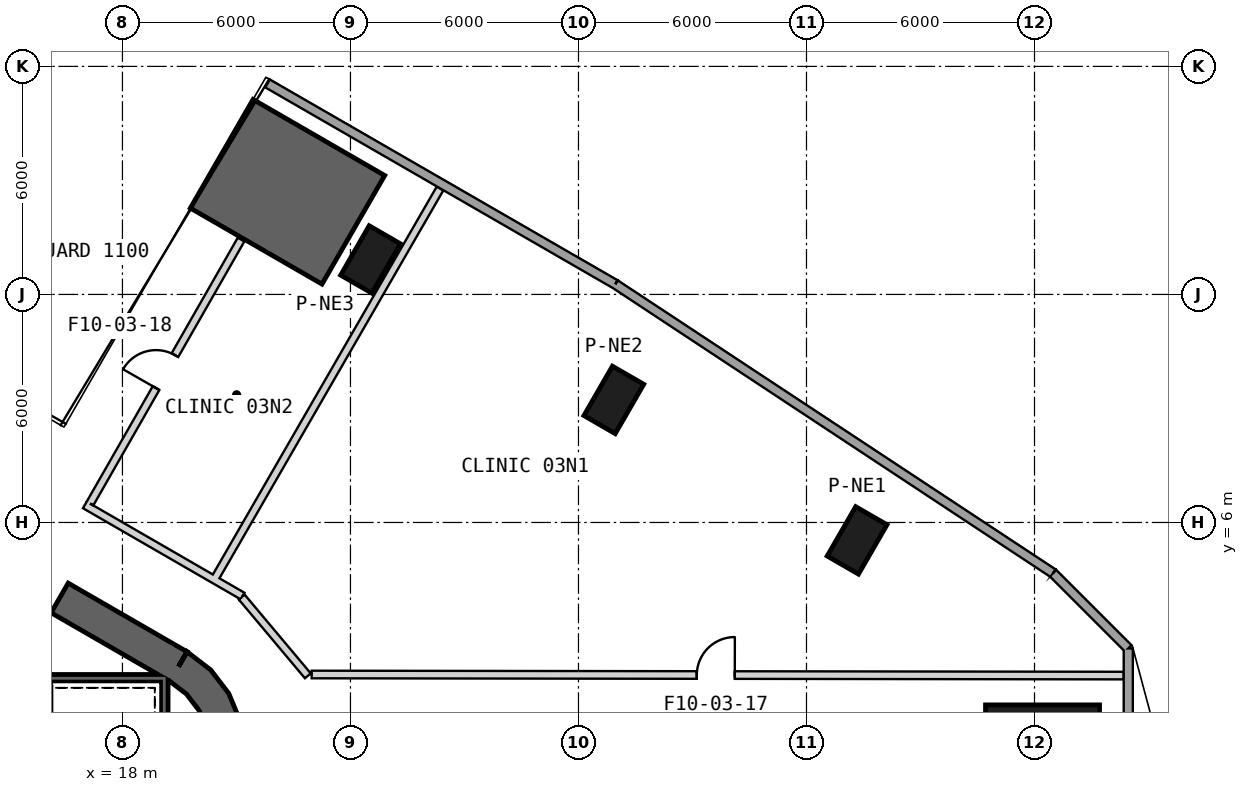
"""IFC4 building model, lengths in metres.
Left out: names, types, materials, properties, quantities, classifications, styles, units other than length and angle.
Written with IfcOpenShell. Run it as: python <this file> out.ifc"""

import sys

from ifc_helpers import new_model, si_unit, direction, frame, frame_2d, origin, origin_2d, place, context, subcontext, project, spatial, polyline, rectangle, outline, extrude, element, fill, save


model = new_model("IFC4")
c1 = context("Model", 3, precision=1e-05, world=origin(), true_north=direction((0.0, 1.0)))
c2 = subcontext(c1, "Body", "Model", "MODEL_VIEW")
j1 = project(units=[si_unit("LENGTHUNIT", "METRE"), si_unit("PLANEANGLEUNIT", "RADIAN")], contexts=[c1])
p1 = place(None, origin())
s1 = spatial("IfcSite", under=j1, at=p1, CompositionType="ELEMENT")
p2 = place(p1, origin())
s2 = spatial("IfcBuilding", under=s1, at=p2, CompositionType="ELEMENT")
p3 = place(p2, frame((0.0, 0.0, 21.5)))
s3 = spatial("IfcBuildingStorey", under=s2, at=p3, CompositionType="ELEMENT", Elevation=21.5)
p4 = place(p3, frame((42.211, 0.0, 0.0), z_axis=(0.0, 0.0, 1.0), x_axis=(1.0, 0.0, 0.0)))
e1 = element("IfcColumn", 1, at=p4, inside=s3, PredefinedType="COLUMN", context=c2, shape_type="SweptSolid", body=[
    extrude(rectangle(XDim=3.0, YDim=2.4, at=origin_2d()), origin(), (0.0, 0.0, 1.0), 6.0),
])
for number, where, z_axis, x_axis in (
    (2, (37.331, 5.528, 0.0), (0.0, 0.0, 1.0), (0.5, 0.866, 0.0)),
    (3, (30.93, 9.224, 0.0), (0.0, 0.0, 1.0), (0.5, 0.866, 0.0)),
    (4, (24.529, 12.92, 0.0), (0.0, 0.0, 1.0), (0.5, 0.866, 0.0)),
):
    element("IfcColumn", number, at=place(p3, frame(where, z_axis=z_axis, x_axis=x_axis)), inside=s3, PredefinedType="COLUMN", context=c2, shape_type="SweptSolid", body=[
        extrude(rectangle(XDim=1.5, YDim=0.95, at=origin_2d()), origin(), (0.0, 0.0, 1.0), 6.0),
    ])
p5 = place(p3, frame((19.475, 2.208, 0.0), z_axis=(0.0, 0.0, 1.0), x_axis=(-0.866028369851, 0.499994862586, 0.0)))
e5 = element("IfcWall", 5, at=p5, inside=s3, PredefinedType="SHEAR", context=c2, shape_type="SweptSolid", body=[
    extrude(rectangle(XDim=31.523, YDim=0.9, at=frame_2d((15.762, 0.0))), origin(), (0.0, 0.0, 1.0), 6.0),
])
p6 = place(p5, frame((7.062, 0.0, 0.0)))
e6 = element("IfcOpeningElement", 6, at=p6, cuts=e5, PredefinedType="OPENING", context=c2, shape_type="SweptSolid", body=[
    extrude(rectangle(XDim=1.2, YDim=2.4, at=frame_2d((0.6, 1.2))), frame((0.0, 0.46, 0.0), z_axis=(0.0, -1.0, 0.0), x_axis=(1.0, 0.0, 0.0)), (0.0, 0.0, 1.0), 0.92),
])
p7 = place(p5, frame((9.762, 0.0, 0.0)))
e7 = element("IfcOpeningElement", 7, at=p7, cuts=e5, PredefinedType="OPENING", context=c2, shape_type="SweptSolid", body=[
    extrude(rectangle(XDim=1.2, YDim=2.4, at=frame_2d((0.6, 1.2))), frame((0.0, 0.46, 0.0), z_axis=(0.0, -1.0, 0.0), x_axis=(1.0, 0.0, 0.0)), (0.0, 0.0, 1.0), 0.92),
])
p8 = place(p5, frame((12.462, 0.0, 0.0)))
e8 = element("IfcOpeningElement", 8, at=p8, cuts=e5, PredefinedType="OPENING", context=c2, shape_type="SweptSolid", body=[
    extrude(rectangle(XDim=1.2, YDim=2.4, at=frame_2d((0.6, 1.2))), frame((0.0, 0.46, 0.0), z_axis=(0.0, -1.0, 0.0), x_axis=(1.0, 0.0, 0.0)), (0.0, 0.0, 1.0), 0.92),
])
p9 = place(p5, frame((15.162, 0.0, 0.0)))
e9 = element("IfcOpeningElement", 9, at=p9, cuts=e5, PredefinedType="OPENING", context=c2, shape_type="SweptSolid", body=[
    extrude(rectangle(XDim=1.2, YDim=2.4, at=frame_2d((0.6, 1.2))), frame((0.0, 0.46, 0.0), z_axis=(0.0, -1.0, 0.0), x_axis=(1.0, 0.0, 0.0)), (0.0, 0.0, 1.0), 0.92),
])
p10 = place(p5, frame((17.862, 0.0, 0.0)))
e10 = element("IfcOpeningElement", 10, at=p10, cuts=e5, PredefinedType="OPENING", context=c2, shape_type="SweptSolid", body=[
    extrude(rectangle(XDim=1.2, YDim=2.4, at=frame_2d((0.6, 1.2))), frame((0.0, 0.46, 0.0), z_axis=(0.0, -1.0, 0.0), x_axis=(1.0, 0.0, 0.0)), (0.0, 0.0, 1.0), 0.92),
])
p11 = place(p5, frame((20.562, 0.0, 0.0)))
e11 = element("IfcOpeningElement", 11, at=p11, cuts=e5, PredefinedType="OPENING", context=c2, shape_type="SweptSolid", body=[
    extrude(rectangle(XDim=1.2, YDim=2.4, at=frame_2d((0.6, 1.2))), frame((0.0, 0.46, 0.0), z_axis=(0.0, -1.0, 0.0), x_axis=(1.0, 0.0, 0.0)), (0.0, 0.0, 1.0), 0.92),
])
p12 = place(p5, frame((23.262, 0.0, 0.0)))
e12 = element("IfcOpeningElement", 12, at=p12, cuts=e5, PredefinedType="OPENING", context=c2, shape_type="SweptSolid", body=[
    extrude(rectangle(XDim=1.2, YDim=2.4, at=frame_2d((0.6, 1.2))), frame((0.0, 0.46, 0.0), z_axis=(0.0, -1.0, 0.0), x_axis=(1.0, 0.0, 0.0)), (0.0, 0.0, 1.0), 0.92),
])
p13 = place(p5, frame((3.612, 0.0, 0.0)))
e13 = element("IfcOpeningElement", 13, at=p13, cuts=e5, PredefinedType="OPENING", context=c2, shape_type="SweptSolid", body=[
    extrude(rectangle(XDim=1.2, YDim=2.4, at=frame_2d((0.6, 1.2))), frame((0.0, 0.46, 0.0), z_axis=(0.0, -1.0, 0.0), x_axis=(1.0, 0.0, 0.0)), (0.0, 0.0, 1.0), 0.92),
])
p14 = place(p5, frame((26.712, 0.0, 0.0)))
e14 = element("IfcOpeningElement", 14, at=p14, cuts=e5, PredefinedType="OPENING", context=c2, shape_type="SweptSolid", body=[
    extrude(rectangle(XDim=1.2, YDim=2.4, at=frame_2d((0.6, 1.2))), frame((0.0, 0.46, 0.0), z_axis=(0.0, -1.0, 0.0), x_axis=(1.0, 0.0, 0.0)), (0.0, 0.0, 1.0), 0.92),
])
p15 = place(p3, origin())
e15 = element("IfcWall", 15, at=p15, inside=s3, PredefinedType="SHEAR", context=c2, shape_type="SweptSolid", body=[
    extrude(outline(polyline([(19.7, -2.598), (20.321, -2.121), (20.798, -1.5), (21.098, -0.777), (21.2, 0.0), (21.098, 0.777), (20.798, 1.5), (20.321, 2.121), (19.7, 2.598), (19.25, 1.819), (19.685, 1.485), (20.019, 1.05), (20.229, 0.543), (20.3, 0.0), (20.229, -0.543), (20.019, -1.05), (19.685, -1.485), (19.25, -1.819), (19.7, -2.598)])), origin(), (0.0, 0.0, 1.0), 6.0),
])
p16 = place(p3, origin())
e16 = element("IfcWall", 16, at=p16, inside=s3, PredefinedType="SHEAR", context=c2, shape_type="SweptSolid", body=[
    extrude(outline(polyline([(24.901, 15.13), (21.437, 17.13), (19.787, 14.272), (23.251, 12.272), (24.901, 15.13)])), origin(), (0.0, 0.0, 1.0), 6.0),
])
p17 = place(p3, frame((42.487, 4.666, 0.0), z_axis=(0.0, 0.0, 1.0), x_axis=(-0.834569880428, 0.550902091739, 0.0)))
e17 = element("IfcWall", 17, at=p17, inside=s3, PredefinedType="SOLIDWALL", context=c2, shape_type="SweptSolid", body=[
    extrude(rectangle(XDim=13.802, YDim=0.24, at=frame_2d((6.901, 0.0))), origin(), (0.0, 0.0, 1.0), 5.7),
])
p18 = place(p3, frame((30.969, 12.269, 0.0), z_axis=(0.0, 0.0, 1.0), x_axis=(-0.86605207128, 0.499953807697, 0.0)))
e18 = element("IfcWall", 18, at=p18, inside=s3, PredefinedType="SOLIDWALL", context=c2, shape_type="SweptSolid", body=[
    extrude(rectangle(XDim=10.566, YDim=0.24, at=frame_2d((5.283, 0.0))), origin(), (0.0, 0.0, 1.0), 5.7),
])
p19 = place(p3, frame((44.468, -2.686, 0.0), z_axis=(0.0, 0.0, 1.0), x_axis=(0.0, 1.0, 0.0)))
e19 = element("IfcWall", 19, at=p19, inside=s3, PredefinedType="SOLIDWALL", context=c2, shape_type="SweptSolid", body=[
    extrude(rectangle(XDim=5.371, YDim=0.24, at=frame_2d((2.686, 0.0))), origin(), (0.0, 0.0, 1.0), 5.7),
])
p20 = place(p3, frame((44.468, 2.686, 0.0), z_axis=(0.0, 0.0, 1.0), x_axis=(-0.707106781187, 0.707106781187, 0.0)))
e20 = element("IfcWall", 20, at=p20, inside=s3, PredefinedType="SOLIDWALL", context=c2, shape_type="SweptSolid", body=[
    extrude(rectangle(XDim=2.801, YDim=0.24, at=frame_2d((1.4, 0.0))), origin(), (0.0, 0.0, 1.0), 5.7),
])
p21 = place(p3, frame((19.2, 1.9, -0.3), z_axis=(0.0, 0.0, 1.0), x_axis=(-1.0, 0.0, 0.0)))
e21 = element("IfcWall", 21, at=p21, inside=s3, PredefinedType="SHEAR", context=c2, shape_type="SweptSolid", body=[
    extrude(rectangle(XDim=8.1, YDim=0.2, at=frame_2d((4.05, 0.0))), origin(), (0.0, 0.0, 1.0), 6.0),
])
p22 = place(p3, frame((19.1, 0.11, -0.3), z_axis=(0.0, 0.0, 1.0), x_axis=(0.0, 1.0, 0.0)))
e22 = element("IfcWall", 22, at=p22, inside=s3, PredefinedType="SHEAR", context=c2, shape_type="SweptSolid", body=[
    extrude(rectangle(XDim=1.69, YDim=0.2, at=frame_2d((0.845, 0.0))), origin(), (0.0, 0.0, 1.0), 6.0),
])
p23 = place(p3, frame((21.161, 4.064, 0.0), z_axis=(0.0, 0.0, 1.0), x_axis=(-0.865926843533, 0.500170672519, 0.0)))
e23 = element("IfcWall", 23, at=p23, inside=s3, PredefinedType="PARTITIONING", context=c2, shape_type="SweptSolid", body=[
    extrude(rectangle(XDim=4.793, YDim=0.2, at=frame_2d((2.396, 0.0))), origin(), (0.0, 0.0, 1.0), 4.88),
])
p24 = place(p3, frame((22.879, 1.964, 0.0), z_axis=(0.0, 0.0, 1.0), x_axis=(-0.642912827124, 0.765939355771, 0.0)))
e24 = element("IfcWall", 24, at=p24, inside=s3, PredefinedType="PARTITIONING", context=c2, shape_type="SweptSolid", body=[
    extrude(rectangle(XDim=2.707, YDim=0.2, at=frame_2d((1.354, 0.0))), origin(), (0.0, 0.0, 1.0), 4.78),
])
p25 = place(p3, frame((22.979, 2.0, 0.0), z_axis=(0.0, 0.0, 1.0), x_axis=(0.999999106495, -0.001336790278, 0.0)))
e25 = element("IfcWall", 25, at=p25, inside=s3, PredefinedType="PARTITIONING", context=c2, shape_type="SweptSolid", body=[
    extrude(rectangle(XDim=21.368, YDim=0.2, at=frame_2d((10.684, 0.0))), origin(), (0.0, 0.0, 1.0), 5.7),
])
p26 = place(p25, frame((10.134, 0.0, 0.0)))
e26 = element("IfcOpeningElement", 26, at=p26, cuts=e25, PredefinedType="OPENING", context=c2, shape_type="SweptSolid", body=[
    extrude(rectangle(XDim=1.0, YDim=2.1, at=frame_2d((0.5, 1.05))), frame((0.0, 0.11, 0.0), z_axis=(0.0, -1.0, 0.0), x_axis=(1.0, 0.0, 0.0)), (0.0, 0.0, 1.0), 0.22),
])
p27 = place(p3, frame((17.146, 6.499, 0.0), z_axis=(0.0, 0.0, 1.0), x_axis=(0.496772917321, 0.867880561262, 0.0)))
e27 = element("IfcWall", 27, at=p27, inside=s3, PredefinedType="PARTITIONING", context=c2, shape_type="SweptSolid", body=[
    extrude(rectangle(XDim=8.002, YDim=0.2, at=frame_2d((4.001, 0.0))), origin(), (0.0, 0.0, 1.0), 5.17),
])
p28 = place(p27, frame((3.499, 0.0, 0.0)))
e28 = element("IfcOpeningElement", 28, at=p28, cuts=e27, PredefinedType="OPENING", context=c2, shape_type="SweptSolid", body=[
    extrude(rectangle(XDim=1.0, YDim=2.1, at=frame_2d((0.5, 1.05))), frame((0.0, 0.11, 0.0), z_axis=(0.0, -1.0, 0.0), x_axis=(1.0, 0.0, 0.0)), (0.0, 0.0, 1.0), 0.22),
])
p29 = place(p3, frame((26.357, 14.787, 0.0), z_axis=(0.0, 0.0, 1.0), x_axis=(-0.499944829582, -0.866057254097, 0.0)))
e29 = element("IfcWall", 29, at=p29, inside=s3, PredefinedType="PARTITIONING", context=c2, shape_type="SweptSolid", body=[
    extrude(rectangle(XDim=11.784, YDim=0.2, at=frame_2d((5.892, 0.0))), origin(), (0.0, 0.0, 1.0), 4.88),
])
p30 = place(p26, origin())
e30 = element("IfcDoor", 30, at=p30, inside=s3, OperationType="SINGLE_SWING_RIGHT", PredefinedType="USERDEFINED", context=c2, shape_type="SweptSolid", body=[
    extrude(rectangle(XDim=1.0, YDim=2.1, at=frame_2d((0.5, 1.05))), frame((0.0, 0.025, 0.0), z_axis=(0.0, -1.0, 0.0), x_axis=(1.0, 0.0, 0.0)), (0.0, 0.0, 1.0), 0.05),
])
fill(e26, e30)
p31 = place(p28, origin())
e31 = element("IfcDoor", 31, at=p31, inside=s3, OperationType="SINGLE_SWING_LEFT", PredefinedType="USERDEFINED", context=c2, shape_type="SweptSolid", body=[
    extrude(rectangle(XDim=1.0, YDim=2.1, at=frame_2d((0.5, 1.05))), frame((0.0, 0.025, 0.0), z_axis=(0.0, -1.0, 0.0), x_axis=(1.0, 0.0, 0.0)), (0.0, 0.0, 1.0), 0.05),
])
fill(e28, e31)
p32 = place(p13, origin())
e32 = element("IfcDoor", 32, at=p32, inside=s3, OperationType="SINGLE_SWING_LEFT", PredefinedType="USERDEFINED", context=c2, shape_type="SweptSolid", body=[
    extrude(rectangle(XDim=1.2, YDim=2.4, at=frame_2d((0.6, 1.2))), frame((0.0, 0.025, 0.0), z_axis=(0.0, -1.0, 0.0), x_axis=(1.0, 0.0, 0.0)), (0.0, 0.0, 1.0), 0.05),
])
fill(e13, e32)
save(model, sys.argv[1])
